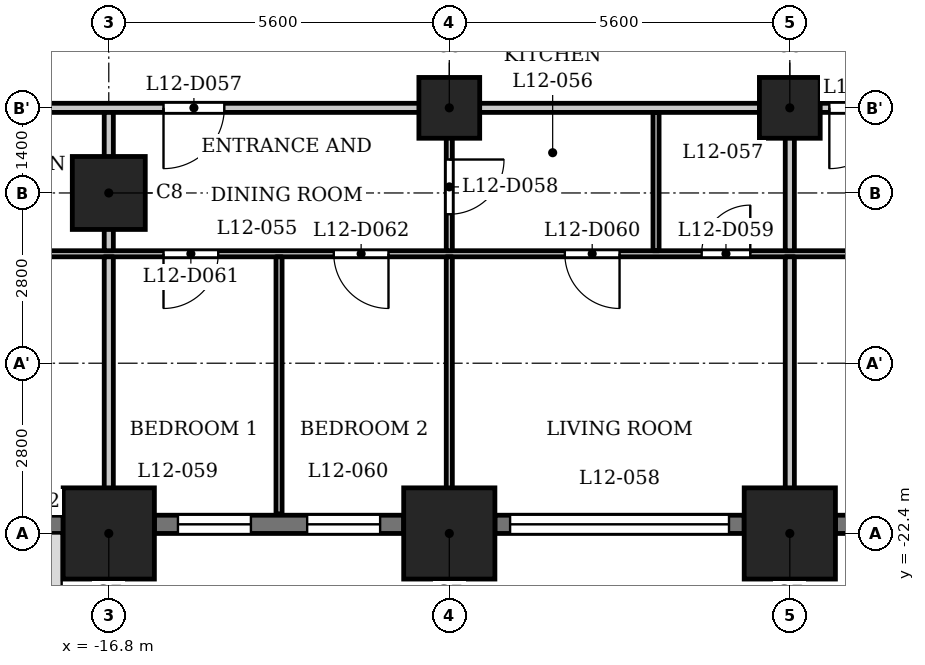
"""IFC4 building model, lengths in metres.
Left out: names, types, materials, properties, quantities, classifications, styles, units other than length and angle.
Written with IfcOpenShell. Run it as: python <this file> out.ifc"""

import sys

from ifc_helpers import new_model, si_unit, direction, frame, frame_2d, origin, origin_2d, place, context, subcontext, project, spatial, rectangle, extrude, element, fill, save


model = new_model("IFC4")
c1 = context("Model", 3, precision=1e-05, world=origin(), true_north=direction((0.0, 1.0)))
c2 = subcontext(c1, "Body", "Model", "MODEL_VIEW")
j1 = project(units=[si_unit("LENGTHUNIT", "METRE"), si_unit("PLANEANGLEUNIT", "RADIAN")], contexts=[c1])
p1 = place(None, origin())
s1 = spatial("IfcSite", under=j1, at=p1, CompositionType="ELEMENT")
p2 = place(p1, origin())
s2 = spatial("IfcBuilding", under=s1, at=p2, CompositionType="ELEMENT")
p3 = place(p2, frame((0.0, 0.0, 51.5)))
s3 = spatial("IfcBuildingStorey", under=s2, at=p3, CompositionType="ELEMENT", Elevation=51.5)
for number, where, z_axis, x_axis in (
    (1, (-16.8, -22.4, 0.0), (0.0, 0.0, 1.0), (1.0, 0.0, 0.0)),
    (2, (-11.2, -22.4, 0.0), (0.0, 0.0, 1.0), (1.0, 0.0, 0.0)),
    (3, (-5.6, -22.4, 0.0), (0.0, 0.0, 1.0), (1.0, 0.0, 0.0)),
):
    element("IfcColumn", number, at=place(p3, frame(where, z_axis=z_axis, x_axis=x_axis)), inside=s3, PredefinedType="COLUMN", context=c2, shape_type="SweptSolid", body=[
        extrude(rectangle(XDim=1.5, YDim=1.5, at=origin_2d()), origin(), (0.0, 0.0, 1.0), 3.5),
    ])
p4 = place(p3, frame((-16.8, -16.8, 0.0), z_axis=(0.0, 0.0, 1.0), x_axis=(1.0, 0.0, 0.0)))
e4 = element("IfcColumn", 4, at=p4, inside=s3, PredefinedType="COLUMN", context=c2, shape_type="SweptSolid", body=[
    extrude(rectangle(XDim=1.2, YDim=1.2, at=origin_2d()), origin(), (0.0, 0.0, 1.0), 3.5),
])
for number, where, z_axis, x_axis in (
    (5, (-11.2, -15.4, 0.0), (0.0, 0.0, 1.0), (1.0, 0.0, 0.0)),
    (6, (-5.6, -15.4, 0.0), (0.0, 0.0, 1.0), (1.0, 0.0, 0.0)),
):
    element("IfcColumn", number, at=place(p3, frame(where, z_axis=z_axis, x_axis=x_axis)), inside=s3, PredefinedType="COLUMN", context=c2, shape_type="SweptSolid", body=[
        extrude(rectangle(XDim=1.0, YDim=1.0, at=origin_2d()), origin(), (0.0, 0.0, 1.0), 3.5),
    ])
p5 = place(p3, frame((-20.0, -22.25, 0.0), z_axis=(0.0, 0.0, 1.0), x_axis=(1.0, 0.0, 0.0)))
e7 = element("IfcWall", 7, at=p5, inside=s3, PredefinedType="SOLIDWALL", context=c2, shape_type="SweptSolid", body=[
    extrude(rectangle(XDim=2.45, YDim=0.3, at=frame_2d((1.225, 0.0))), origin(), (0.0, 0.0, 1.0), 2.35),
])
p6 = place(p5, frame((0.325, 0.0, 0.9)))
e8 = element("IfcOpeningElement", 8, at=p6, cuts=e7, PredefinedType="OPENING", context=c2, shape_type="SweptSolid", body=[
    extrude(rectangle(XDim=1.8, YDim=1.25, at=frame_2d((0.9, 0.625))), frame((0.0, 0.16, 0.0), z_axis=(0.0, -1.0, 0.0), x_axis=(1.0, 0.0, 0.0)), (0.0, 0.0, 1.0), 0.32),
])
p7 = place(p3, frame((-16.05, -22.25, 0.0), z_axis=(0.0, 0.0, 1.0), x_axis=(1.0, 0.0, 0.0)))
e9 = element("IfcWall", 9, at=p7, inside=s3, PredefinedType="SOLIDWALL", context=c2, shape_type="SweptSolid", body=[
    extrude(rectangle(XDim=4.1, YDim=0.3, at=frame_2d((2.05, 0.0))), origin(), (0.0, 0.0, 1.0), 2.35),
])
p8 = place(p7, frame((0.387, 0.0, 0.6)))
e10 = element("IfcOpeningElement", 10, at=p8, cuts=e9, PredefinedType="OPENING", context=c2, shape_type="SweptSolid", body=[
    extrude(rectangle(XDim=1.2, YDim=1.55, at=frame_2d((0.6, 0.775))), frame((0.0, 0.16, 0.0), z_axis=(0.0, -1.0, 0.0), x_axis=(1.0, 0.0, 0.0)), (0.0, 0.0, 1.0), 0.32),
])
p9 = place(p7, frame((2.512, 0.0, 0.6)))
e11 = element("IfcOpeningElement", 11, at=p9, cuts=e9, PredefinedType="OPENING", context=c2, shape_type="SweptSolid", body=[
    extrude(rectangle(XDim=1.2, YDim=1.55, at=frame_2d((0.6, 0.775))), frame((0.0, 0.16, 0.0), z_axis=(0.0, -1.0, 0.0), x_axis=(1.0, 0.0, 0.0)), (0.0, 0.0, 1.0), 0.32),
])
p10 = place(p3, frame((-10.45, -22.25, 0.0), z_axis=(0.0, 0.0, 1.0), x_axis=(1.0, 0.0, 0.0)))
e12 = element("IfcWall", 12, at=p10, inside=s3, PredefinedType="SOLIDWALL", context=c2, shape_type="SweptSolid", body=[
    extrude(rectangle(XDim=4.1, YDim=0.3, at=frame_2d((2.05, 0.0))), origin(), (0.0, 0.0, 1.0), 2.35),
])
p11 = place(p10, frame((0.25, 0.0, 1.2)))
e13 = element("IfcOpeningElement", 13, at=p11, cuts=e12, PredefinedType="OPENING", context=c2, shape_type="SweptSolid", body=[
    extrude(rectangle(XDim=3.6, YDim=0.95, at=frame_2d((1.8, 0.475))), frame((0.0, 0.16, 0.0), z_axis=(0.0, -1.0, 0.0), x_axis=(1.0, 0.0, 0.0)), (0.0, 0.0, 1.0), 0.32),
])
p12 = place(p3, frame((-4.85, -22.25, 0.0), z_axis=(0.0, 0.0, 1.0), x_axis=(1.0, 0.0, 0.0)))
e14 = element("IfcWall", 14, at=p12, inside=s3, PredefinedType="SOLIDWALL", context=c2, shape_type="SweptSolid", body=[
    extrude(rectangle(XDim=4.1, YDim=0.3, at=frame_2d((2.05, 0.0))), origin(), (0.0, 0.0, 1.0), 2.35),
])
p13 = place(p12, frame((0.25, 0.0, 1.2)))
e15 = element("IfcOpeningElement", 15, at=p13, cuts=e14, PredefinedType="OPENING", context=c2, shape_type="SweptSolid", body=[
    extrude(rectangle(XDim=3.6, YDim=0.95, at=frame_2d((1.8, 0.475))), frame((0.0, 0.16, 0.0), z_axis=(0.0, -1.0, 0.0), x_axis=(1.0, 0.0, 0.0)), (0.0, 0.0, 1.0), 0.32),
])
p14 = place(p3, frame((-26.394, -17.8, 0.0), z_axis=(0.0, 0.0, 1.0), x_axis=(1.0, 0.0, 0.0)))
e16 = element("IfcWall", 16, at=p14, inside=s3, PredefinedType="PARTITIONING", context=c2, shape_type="SweptSolid", body=[
    extrude(rectangle(XDim=53.126, YDim=0.1, at=frame_2d((26.563, 0.0))), origin(), (0.0, 0.0, 1.0), 3.2),
])
p15 = place(p14, frame((0.794, 0.0, 0.0)))
e17 = element("IfcOpeningElement", 17, at=p15, cuts=e16, PredefinedType="OPENING", context=c2, shape_type="SweptSolid", body=[
    extrude(rectangle(XDim=0.8, YDim=2.1, at=frame_2d((0.4, 1.05))), frame((0.0, 0.06, 0.0), z_axis=(0.0, -1.0, 0.0), x_axis=(1.0, 0.0, 0.0)), (0.0, 0.0, 1.0), 0.12),
])
p16 = place(p14, frame((5.644, 0.0, 0.0)))
e18 = element("IfcOpeningElement", 18, at=p16, cuts=e16, PredefinedType="OPENING", context=c2, shape_type="SweptSolid", body=[
    extrude(rectangle(XDim=0.9, YDim=2.1, at=frame_2d((0.45, 1.05))), frame((0.0, 0.06, 0.0), z_axis=(0.0, -1.0, 0.0), x_axis=(1.0, 0.0, 0.0)), (0.0, 0.0, 1.0), 0.12),
])
p17 = place(p14, frame((19.344, 0.0, 0.0)))
e19 = element("IfcOpeningElement", 19, at=p17, cuts=e16, PredefinedType="OPENING", context=c2, shape_type="SweptSolid", body=[
    extrude(rectangle(XDim=0.8, YDim=2.1, at=frame_2d((0.4, 1.05))), frame((0.0, 0.06, 0.0), z_axis=(0.0, -1.0, 0.0), x_axis=(1.0, 0.0, 0.0)), (0.0, 0.0, 1.0), 0.12),
])
p18 = place(p14, frame((17.094, 0.0, 0.0)))
e20 = element("IfcOpeningElement", 20, at=p18, cuts=e16, PredefinedType="OPENING", context=c2, shape_type="SweptSolid", body=[
    extrude(rectangle(XDim=0.9, YDim=2.1, at=frame_2d((0.45, 1.05))), frame((0.0, 0.06, 0.0), z_axis=(0.0, -1.0, 0.0), x_axis=(1.0, 0.0, 0.0)), (0.0, 0.0, 1.0), 0.12),
])
p19 = place(p14, frame((10.494, 0.0, 0.0)))
e21 = element("IfcOpeningElement", 21, at=p19, cuts=e16, PredefinedType="OPENING", context=c2, shape_type="SweptSolid", body=[
    extrude(rectangle(XDim=0.9, YDim=2.1, at=frame_2d((0.45, 1.05))), frame((0.0, 0.06, 0.0), z_axis=(0.0, -1.0, 0.0), x_axis=(1.0, 0.0, 0.0)), (0.0, 0.0, 1.0), 0.12),
])
p20 = place(p14, frame((13.294, 0.0, 0.0)))
e22 = element("IfcOpeningElement", 22, at=p20, cuts=e16, PredefinedType="OPENING", context=c2, shape_type="SweptSolid", body=[
    extrude(rectangle(XDim=0.9, YDim=2.1, at=frame_2d((0.45, 1.05))), frame((0.0, 0.06, 0.0), z_axis=(0.0, -1.0, 0.0), x_axis=(1.0, 0.0, 0.0)), (0.0, 0.0, 1.0), 0.12),
])
p21 = place(p14, frame((27.044, 0.0, 0.0)))
e23 = element("IfcOpeningElement", 23, at=p21, cuts=e16, PredefinedType="OPENING", context=c2, shape_type="SweptSolid", body=[
    extrude(rectangle(XDim=0.8, YDim=2.1, at=frame_2d((0.4, 1.05))), frame((0.0, 0.06, 0.0), z_axis=(0.0, -1.0, 0.0), x_axis=(1.0, 0.0, 0.0)), (0.0, 0.0, 1.0), 0.12),
])
p22 = place(p14, frame((22.444, 0.0, 0.0)))
e24 = element("IfcOpeningElement", 24, at=p22, cuts=e16, PredefinedType="OPENING", context=c2, shape_type="SweptSolid", body=[
    extrude(rectangle(XDim=0.9, YDim=2.1, at=frame_2d((0.45, 1.05))), frame((0.0, 0.06, 0.0), z_axis=(0.0, -1.0, 0.0), x_axis=(1.0, 0.0, 0.0)), (0.0, 0.0, 1.0), 0.12),
])
p23 = place(p14, frame((36.144, 0.0, 0.0)))
e25 = element("IfcOpeningElement", 25, at=p23, cuts=e16, PredefinedType="OPENING", context=c2, shape_type="SweptSolid", body=[
    extrude(rectangle(XDim=0.8, YDim=2.1, at=frame_2d((0.4, 1.05))), frame((0.0, 0.06, 0.0), z_axis=(0.0, -1.0, 0.0), x_axis=(1.0, 0.0, 0.0)), (0.0, 0.0, 1.0), 0.12),
])
p24 = place(p14, frame((33.644, 0.0, 0.0)))
e26 = element("IfcOpeningElement", 26, at=p24, cuts=e16, PredefinedType="OPENING", context=c2, shape_type="SweptSolid", body=[
    extrude(rectangle(XDim=0.9, YDim=2.1, at=frame_2d((0.45, 1.05))), frame((0.0, 0.06, 0.0), z_axis=(0.0, -1.0, 0.0), x_axis=(1.0, 0.0, 0.0)), (0.0, 0.0, 1.0), 0.12),
])
p25 = place(p14, frame((39.144, 0.0, 0.0)))
e27 = element("IfcOpeningElement", 27, at=p25, cuts=e16, PredefinedType="OPENING", context=c2, shape_type="SweptSolid", body=[
    extrude(rectangle(XDim=0.8, YDim=2.1, at=frame_2d((0.4, 1.05))), frame((0.0, 0.06, 0.0), z_axis=(0.0, -1.0, 0.0), x_axis=(1.0, 0.0, 0.0)), (0.0, 0.0, 1.0), 0.12),
])
p26 = place(p14, frame((41.494, 0.0, 0.0)))
e28 = element("IfcOpeningElement", 28, at=p26, cuts=e16, PredefinedType="OPENING", context=c2, shape_type="SweptSolid", body=[
    extrude(rectangle(XDim=0.9, YDim=2.1, at=frame_2d((0.45, 1.05))), frame((0.0, 0.06, 0.0), z_axis=(0.0, -1.0, 0.0), x_axis=(1.0, 0.0, 0.0)), (0.0, 0.0, 1.0), 0.12),
])
p27 = place(p14, frame((49.362, 0.0, 0.0)))
e29 = element("IfcOpeningElement", 29, at=p27, cuts=e16, PredefinedType="OPENING", context=c2, shape_type="SweptSolid", body=[
    extrude(rectangle(XDim=0.8, YDim=2.1, at=frame_2d((0.4, 1.05))), frame((0.0, 0.06, 0.0), z_axis=(0.0, -1.0, 0.0), x_axis=(1.0, 0.0, 0.0)), (0.0, 0.0, 1.0), 0.12),
])
p28 = place(p14, frame((45.094, 0.0, 0.0)))
e30 = element("IfcOpeningElement", 30, at=p28, cuts=e16, PredefinedType="OPENING", context=c2, shape_type="SweptSolid", body=[
    extrude(rectangle(XDim=0.9, YDim=2.1, at=frame_2d((0.45, 1.05))), frame((0.0, 0.06, 0.0), z_axis=(0.0, -1.0, 0.0), x_axis=(1.0, 0.0, 0.0)), (0.0, 0.0, 1.0), 0.12),
])
p29 = place(p3, frame((-27.484, -15.4, 0.0), z_axis=(0.0, 0.0, 1.0), x_axis=(1.0, 0.0, 0.0)))
e31 = element("IfcWall", 31, at=p29, inside=s3, PredefinedType="PARTITIONING", context=c2, shape_type="SweptSolid", body=[
    extrude(rectangle(XDim=54.968, YDim=0.15, at=frame_2d((27.484, 0.0))), origin(), (0.0, 0.0, 1.0), 3.2),
])
p30 = place(p29, frame((5.734, 0.0, 0.0)))
e32 = element("IfcOpeningElement", 32, at=p30, cuts=e31, PredefinedType="OPENING", context=c2, shape_type="SweptSolid", body=[
    extrude(rectangle(XDim=1.0, YDim=2.1, at=frame_2d((0.5, 1.05))), frame((0.0, 0.085, 0.0), z_axis=(0.0, -1.0, 0.0), x_axis=(1.0, 0.0, 0.0)), (0.0, 0.0, 1.0), 0.17),
])
p31 = place(p29, frame((11.584, 0.0, 0.0)))
e33 = element("IfcOpeningElement", 33, at=p31, cuts=e31, PredefinedType="OPENING", context=c2, shape_type="SweptSolid", body=[
    extrude(rectangle(XDim=1.0, YDim=2.1, at=frame_2d((0.5, 1.05))), frame((0.0, 0.085, 0.0), z_axis=(0.0, -1.0, 0.0), x_axis=(1.0, 0.0, 0.0)), (0.0, 0.0, 1.0), 0.17),
])
p32 = place(p29, frame((22.534, 0.0, 0.0)))
e34 = element("IfcOpeningElement", 34, at=p32, cuts=e31, PredefinedType="OPENING", context=c2, shape_type="SweptSolid", body=[
    extrude(rectangle(XDim=1.0, YDim=2.1, at=frame_2d((0.5, 1.05))), frame((0.0, 0.085, 0.0), z_axis=(0.0, -1.0, 0.0), x_axis=(1.0, 0.0, 0.0)), (0.0, 0.0, 1.0), 0.17),
])
p33 = place(p29, frame((33.734, 0.0, 0.0)))
e35 = element("IfcOpeningElement", 35, at=p33, cuts=e31, PredefinedType="OPENING", context=c2, shape_type="SweptSolid", body=[
    extrude(rectangle(XDim=1.0, YDim=2.1, at=frame_2d((0.5, 1.05))), frame((0.0, 0.085, 0.0), z_axis=(0.0, -1.0, 0.0), x_axis=(1.0, 0.0, 0.0)), (0.0, 0.0, 1.0), 0.17),
])
p34 = place(p29, frame((42.334, 0.0, 0.0)))
e36 = element("IfcOpeningElement", 36, at=p34, cuts=e31, PredefinedType="OPENING", context=c2, shape_type="SweptSolid", body=[
    extrude(rectangle(XDim=1.0, YDim=2.1, at=frame_2d((0.5, 1.05))), frame((0.0, 0.085, 0.0), z_axis=(0.0, -1.0, 0.0), x_axis=(1.0, 0.0, 0.0)), (0.0, 0.0, 1.0), 0.17),
])
p35 = place(p29, frame((45.184, 0.0, 0.0)))
e37 = element("IfcOpeningElement", 37, at=p35, cuts=e31, PredefinedType="OPENING", context=c2, shape_type="SweptSolid", body=[
    extrude(rectangle(XDim=1.0, YDim=2.1, at=frame_2d((0.5, 1.05))), frame((0.0, 0.085, 0.0), z_axis=(0.0, -1.0, 0.0), x_axis=(1.0, 0.0, 0.0)), (0.0, 0.0, 1.0), 0.17),
])
p36 = place(p3, frame((-16.8, -23.13, 0.0), z_axis=(0.0, 0.0, 1.0), x_axis=(0.0, 1.0, 0.0)))
e38 = element("IfcWall", 38, at=p36, inside=s3, PredefinedType="PARTITIONING", context=c2, shape_type="SweptSolid", body=[
    extrude(rectangle(XDim=5.28, YDim=0.15, at=frame_2d((2.64, 0.0))), origin(), (0.0, 0.0, 1.0), 3.2),
])
p37 = place(p3, frame((-16.8, -17.75, 0.0), z_axis=(0.0, 0.0, 1.0), x_axis=(0.0, 1.0, 0.0)))
e39 = element("IfcWall", 39, at=p37, inside=s3, PredefinedType="PARTITIONING", context=c2, shape_type="SweptSolid", body=[
    extrude(rectangle(XDim=2.275, YDim=0.15, at=frame_2d((1.137, 0.0))), origin(), (0.0, 0.0, 1.0), 3.2),
])
p38 = place(p3, frame((-14.0, -22.08, 0.0), z_axis=(0.0, 0.0, 1.0), x_axis=(0.0, 1.0, 0.0)))
e40 = element("IfcWall", 40, at=p38, inside=s3, PredefinedType="PARTITIONING", context=c2, shape_type="SweptSolid", body=[
    extrude(rectangle(XDim=4.23, YDim=0.1, at=frame_2d((2.115, 0.0))), origin(), (0.0, 0.0, 1.0), 3.2),
])
p39 = place(p3, frame((-11.2, -23.13, 0.0), z_axis=(0.0, 0.0, 1.0), x_axis=(0.0, 1.0, 0.0)))
e41 = element("IfcWall", 41, at=p39, inside=s3, PredefinedType="PARTITIONING", context=c2, shape_type="SweptSolid", body=[
    extrude(rectangle(XDim=5.28, YDim=0.1, at=frame_2d((2.64, 0.0))), origin(), (0.0, 0.0, 1.0), 3.2),
])
p40 = place(p3, frame((-11.2, -17.75, 0.0), z_axis=(0.0, 0.0, 1.0), x_axis=(0.0, 1.0, 0.0)))
e42 = element("IfcWall", 42, at=p40, inside=s3, PredefinedType="PARTITIONING", context=c2, shape_type="SweptSolid", body=[
    extrude(rectangle(XDim=2.275, YDim=0.1, at=frame_2d((1.137, 0.0))), origin(), (0.0, 0.0, 1.0), 3.2),
])
p41 = place(p40, frame((0.6, 0.0, 0.0)))
e43 = element("IfcOpeningElement", 43, at=p41, cuts=e42, PredefinedType="OPENING", context=c2, shape_type="SweptSolid", body=[
    extrude(rectangle(XDim=0.9, YDim=2.1, at=frame_2d((0.45, 1.05))), frame((0.0, 0.06, 0.0), z_axis=(0.0, -1.0, 0.0), x_axis=(1.0, 0.0, 0.0)), (0.0, 0.0, 1.0), 0.12),
])
p42 = place(p3, frame((-7.8, -17.75, 0.0), z_axis=(0.0, 0.0, 1.0), x_axis=(0.0, 1.0, 0.0)))
e44 = element("IfcWall", 44, at=p42, inside=s3, PredefinedType="PARTITIONING", context=c2, shape_type="SweptSolid", body=[
    extrude(rectangle(XDim=2.275, YDim=0.1, at=frame_2d((1.137, 0.0))), origin(), (0.0, 0.0, 1.0), 3.2),
])
p43 = place(p3, frame((-5.6, -23.13, 0.0), z_axis=(0.0, 0.0, 1.0), x_axis=(0.0, 1.0, 0.0)))
e45 = element("IfcWall", 45, at=p43, inside=s3, PredefinedType="PARTITIONING", context=c2, shape_type="SweptSolid", body=[
    extrude(rectangle(XDim=5.28, YDim=0.15, at=frame_2d((2.64, 0.0))), origin(), (0.0, 0.0, 1.0), 3.2),
])
p44 = place(p3, frame((-5.6, -17.75, 0.0), z_axis=(0.0, 0.0, 1.0), x_axis=(0.0, 1.0, 0.0)))
e46 = element("IfcWall", 46, at=p44, inside=s3, PredefinedType="PARTITIONING", context=c2, shape_type="SweptSolid", body=[
    extrude(rectangle(XDim=2.275, YDim=0.15, at=frame_2d((1.137, 0.0))), origin(), (0.0, 0.0, 1.0), 3.2),
])
p45 = place(p31, origin())
e47 = element("IfcDoor", 47, at=p45, inside=s3, OperationType="SINGLE_SWING_LEFT", PredefinedType="DOOR", context=c2, shape_type="SweptSolid", body=[
    extrude(rectangle(XDim=1.0, YDim=2.1, at=frame_2d((0.5, 1.05))), frame((0.0, 0.025, 0.0), z_axis=(0.0, -1.0, 0.0), x_axis=(1.0, 0.0, 0.0)), (0.0, 0.0, 1.0), 0.05),
])
fill(e33, e47)
p46 = place(p41, origin())
e48 = element("IfcDoor", 48, at=p46, inside=s3, OperationType="SINGLE_SWING_RIGHT", PredefinedType="DOOR", context=c2, shape_type="SweptSolid", body=[
    extrude(rectangle(XDim=0.9, YDim=2.1, at=frame_2d((0.45, 1.05))), frame((0.0, 0.025, 0.0), z_axis=(0.0, -1.0, 0.0), x_axis=(1.0, 0.0, 0.0)), (0.0, 0.0, 1.0), 0.05),
])
fill(e43, e48)
p47 = place(p17, origin())
e49 = element("IfcDoor", 49, at=p47, inside=s3, OperationType="SINGLE_SWING_LEFT", PredefinedType="DOOR", context=c2, shape_type="SweptSolid", body=[
    extrude(rectangle(XDim=0.8, YDim=2.1, at=frame_2d((0.4, 1.05))), frame((0.0, 0.025, 0.0), z_axis=(0.0, -1.0, 0.0), x_axis=(1.0, 0.0, 0.0)), (0.0, 0.0, 1.0), 0.05),
])
fill(e19, e49)
p48 = place(p18, origin())
e50 = element("IfcDoor", 50, at=p48, inside=s3, OperationType="SINGLE_SWING_RIGHT", PredefinedType="DOOR", context=c2, shape_type="SweptSolid", body=[
    extrude(rectangle(XDim=0.9, YDim=2.1, at=frame_2d((0.45, 1.05))), frame((0.0, 0.025, 0.0), z_axis=(0.0, -1.0, 0.0), x_axis=(1.0, 0.0, 0.0)), (0.0, 0.0, 1.0), 0.05),
])
fill(e20, e50)
p49 = place(p19, origin())
e51 = element("IfcDoor", 51, at=p49, inside=s3, OperationType="SINGLE_SWING_LEFT", PredefinedType="DOOR", context=c2, shape_type="SweptSolid", body=[
    extrude(rectangle(XDim=0.9, YDim=2.1, at=frame_2d((0.45, 1.05))), frame((0.0, 0.025, 0.0), z_axis=(0.0, -1.0, 0.0), x_axis=(1.0, 0.0, 0.0)), (0.0, 0.0, 1.0), 0.05),
])
fill(e21, e51)
p50 = place(p20, origin())
e52 = element("IfcDoor", 52, at=p50, inside=s3, OperationType="SINGLE_SWING_RIGHT", PredefinedType="DOOR", context=c2, shape_type="SweptSolid", body=[
    extrude(rectangle(XDim=0.9, YDim=2.1, at=frame_2d((0.45, 1.05))), frame((0.0, 0.025, 0.0), z_axis=(0.0, -1.0, 0.0), x_axis=(1.0, 0.0, 0.0)), (0.0, 0.0, 1.0), 0.05),
])
fill(e22, e52)
p51 = place(p32, origin())
e53 = element("IfcDoor", 53, at=p51, inside=s3, OperationType="SINGLE_SWING_LEFT", PredefinedType="DOOR", context=c2, shape_type="SweptSolid", body=[
    extrude(rectangle(XDim=1.0, YDim=2.1, at=frame_2d((0.5, 1.05))), frame((0.0, 0.025, 0.0), z_axis=(0.0, -1.0, 0.0), x_axis=(1.0, 0.0, 0.0)), (0.0, 0.0, 1.0), 0.05),
])
fill(e34, e53)
p52 = place(p8, origin())
e54 = element("IfcWindow", 54, at=p52, inside=s3, PartitioningType="SINGLE_PANEL", PredefinedType="WINDOW", context=c2, shape_type="SweptSolid", body=[
    extrude(rectangle(XDim=1.2, YDim=1.55, at=frame_2d((0.6, 0.775))), frame((0.0, 0.03, 0.0), z_axis=(0.0, -1.0, 0.0), x_axis=(1.0, 0.0, 0.0)), (0.0, 0.0, 1.0), 0.06),
])
fill(e10, e54)
p53 = place(p9, origin())
e55 = element("IfcWindow", 55, at=p53, inside=s3, PartitioningType="SINGLE_PANEL", PredefinedType="WINDOW", context=c2, shape_type="SweptSolid", body=[
    extrude(rectangle(XDim=1.2, YDim=1.55, at=frame_2d((0.6, 0.775))), frame((0.0, 0.03, 0.0), z_axis=(0.0, -1.0, 0.0), x_axis=(1.0, 0.0, 0.0)), (0.0, 0.0, 1.0), 0.06),
])
fill(e11, e55)
p54 = place(p11, origin())
e56 = element("IfcWindow", 56, at=p54, inside=s3, PartitioningType="SINGLE_PANEL", PredefinedType="WINDOW", context=c2, shape_type="SweptSolid", body=[
    extrude(rectangle(XDim=3.6, YDim=0.95, at=frame_2d((1.8, 0.475))), frame((0.0, 0.03, 0.0), z_axis=(0.0, -1.0, 0.0), x_axis=(1.0, 0.0, 0.0)), (0.0, 0.0, 1.0), 0.06),
])
fill(e13, e56)
save(model, sys.argv[1])
